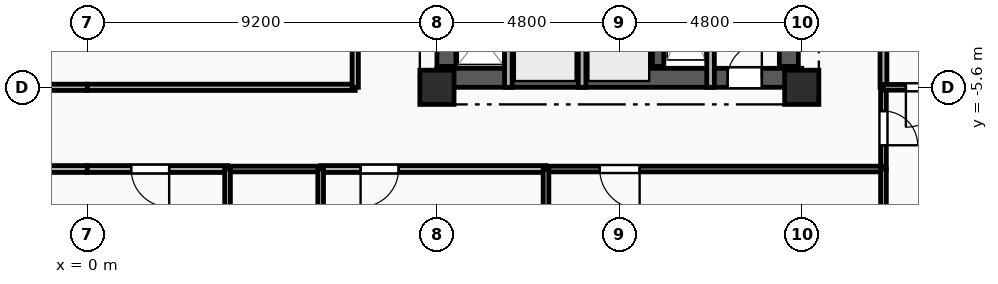
"""IFC4 building model, lengths in metres.
Left out: names, types, materials, properties, quantities, classifications, styles, units other than length and angle.
Written with IfcOpenShell. Run it as: python <this file> out.ifc"""

import sys

from ifc_helpers import new_model, si_unit, direction, frame, frame_2d, origin, origin_2d, place, context, subcontext, project, spatial, rectangle, extrude, element, fill, save


model = new_model("IFC4")
c1 = context("Model", 3, precision=1e-05, world=origin(), true_north=direction((0.0, 1.0)))
c2 = subcontext(c1, "Body", "Model", "MODEL_VIEW")
j1 = project(units=[si_unit("LENGTHUNIT", "METRE"), si_unit("PLANEANGLEUNIT", "RADIAN")], contexts=[c1])
p1 = place(None, origin())
s1 = spatial("IfcSite", under=j1, at=p1, CompositionType="ELEMENT")
p2 = place(p1, origin())
s2 = spatial("IfcBuilding", under=s1, at=p2, CompositionType="ELEMENT")
p3 = place(p2, frame((0.0, 0.0, 134.35)))
s3 = spatial("IfcBuildingStorey", under=s2, at=p3, CompositionType="ELEMENT", Elevation=134.35)
for number, where, z_axis, x_axis in (
    (1, (9.2, -5.6, 0.0), (0.0, 0.0, 1.0), (1.0, 0.0, 0.0)),
    (2, (18.8, -5.6, 0.0), (0.0, 0.0, 1.0), (1.0, 0.0, 0.0)),
):
    element("IfcColumn", number, at=place(p3, frame(where, z_axis=z_axis, x_axis=x_axis)), inside=s3, PredefinedType="COLUMN", context=c2, shape_type="SweptSolid", body=[
        extrude(rectangle(XDim=0.9, YDim=0.9, at=origin_2d()), origin(), (0.0, 0.0, 1.0), 3.35),
    ])
p4 = place(p3, frame((9.2, -5.35, 0.0), z_axis=(0.0, 0.0, 1.0), x_axis=(1.0, 0.0, 0.0)))
e3 = element("IfcWall", 3, at=p4, inside=s3, PredefinedType="SHEAR", context=c2, shape_type="SweptSolid", body=[
    extrude(rectangle(XDim=9.6, YDim=0.5, at=frame_2d((4.8, 0.0))), origin(), (0.0, 0.0, 1.0), 3.04),
])
p5 = place(p4, frame((7.65, 0.0, 0.0)))
e4 = element("IfcOpeningElement", 4, at=p5, cuts=e3, PredefinedType="OPENING", context=c2, shape_type="SweptSolid", body=[
    extrude(rectangle(XDim=0.9, YDim=2.1, at=frame_2d((0.45, 1.05))), frame((0.0, 0.26, 0.0), z_axis=(0.0, -1.0, 0.0), x_axis=(1.0, 0.0, 0.0)), (0.0, 0.0, 1.0), 0.52),
])
p6 = place(p3, frame((9.45, -5.05, 0.0), z_axis=(0.0, 0.0, 1.0), x_axis=(0.0, 1.0, 0.0)))
e5 = element("IfcWall", 5, at=p6, inside=s3, PredefinedType="SHEAR", context=c2, shape_type="SweptSolid", body=[
    extrude(rectangle(XDim=10.1, YDim=0.5, at=frame_2d((5.05, 0.0))), origin(), (0.0, 0.0, 1.0), 3.04),
])
p7 = place(p6, frame((7.15, 0.0, 0.0)))
e6 = element("IfcOpeningElement", 6, at=p7, cuts=e5, PredefinedType="OPENING", context=c2, shape_type="SweptSolid", body=[
    extrude(rectangle(XDim=0.9, YDim=2.1, at=frame_2d((0.45, 1.05))), frame((0.0, 0.26, 0.0), z_axis=(0.0, -1.0, 0.0), x_axis=(1.0, 0.0, 0.0)), (0.0, 0.0, 1.0), 0.52),
])
p8 = place(p6, frame((2.4, 0.0, 0.0)))
e7 = element("IfcOpeningElement", 7, at=p8, cuts=e5, PredefinedType="OPENING", context=c2, shape_type="SweptSolid", body=[
    extrude(rectangle(XDim=1.2, YDim=2.15, at=frame_2d((0.6, 1.075))), frame((0.0, 0.26, 0.0), z_axis=(0.0, -1.0, 0.0), x_axis=(1.0, 0.0, 0.0)), (0.0, 0.0, 1.0), 0.52),
])
p9 = place(p3, frame((18.46, -5.05, 0.0), z_axis=(0.0, 0.0, 1.0), x_axis=(0.0, 1.0, 0.0)))
e8 = element("IfcWall", 8, at=p9, inside=s3, PredefinedType="SHEAR", context=c2, shape_type="SweptSolid", body=[
    extrude(rectangle(XDim=10.1, YDim=0.5, at=frame_2d((5.05, 0.0))), origin(), (0.0, 0.0, 1.0), 3.04),
])
p10 = place(p3, frame((15.02, -5.05, 0.0), z_axis=(0.0, 0.0, 1.0), x_axis=(0.0, 1.0, 0.0)))
e9 = element("IfcWall", 9, at=p10, inside=s3, PredefinedType="SHEAR", context=c2, shape_type="SweptSolid", body=[
    extrude(rectangle(XDim=10.1, YDim=0.3, at=frame_2d((5.05, 0.0))), origin(), (0.0, 0.0, 1.0), 3.04),
])
p11 = place(p3, frame((16.4, -2.11, 0.0), z_axis=(0.0, 0.0, 1.0), x_axis=(0.0, -1.0, 0.0)))
e10 = element("IfcWall", 10, at=p11, inside=s3, PredefinedType="PARTITIONING", context=c2, shape_type="SweptSolid", body=[
    extrude(rectangle(XDim=3.49, YDim=0.2, at=frame_2d((1.745, 0.0))), origin(), (0.0, 0.0, 1.0), 3.04),
])
for number, where, z_axis, x_axis in (
    (11, (11.08, -5.6, 0.0), (0.0, 0.0, 1.0), (0.0, 1.0, 0.0)),
    (12, (13.02, -5.6, 0.0), (0.0, 0.0, 1.0), (0.0, 1.0, 0.0)),
):
    element("IfcWall", number, at=place(p3, frame(where, z_axis=z_axis, x_axis=x_axis)), inside=s3, PredefinedType="PARTITIONING", context=c2, shape_type="SweptSolid", body=[
        extrude(rectangle(XDim=2.25, YDim=0.2, at=frame_2d((1.125, 0.0))), origin(), (0.0, 0.0, 1.0), 3.04),
    ])
p12 = place(p3, frame((0.0, -7.75, 0.0), z_axis=(0.0, 0.0, 1.0), x_axis=(-1.0, 0.0, 0.0)))
e13 = element("IfcWall", 13, at=p12, inside=s3, PredefinedType="PARTITIONING", context=c2, shape_type="SweptSolid", body=[
    extrude(rectangle(XDim=2.24, YDim=0.18, at=frame_2d((1.12, 0.0))), origin(), (0.0, 0.0, 1.0), 3.04),
])
p13 = place(p3, frame((-7.05, -5.6, 0.0), z_axis=(0.0, 0.0, 1.0), x_axis=(1.0, 0.0, 0.0)))
e14 = element("IfcWall", 14, at=p13, inside=s3, PredefinedType="PARTITIONING", context=c2, shape_type="SweptSolid", body=[
    extrude(rectangle(XDim=7.05, YDim=0.165, at=frame_2d((3.525, 0.0))), origin(), (0.0, 0.0, 1.0), 2.525),
])
p14 = place(p3, frame((20.95, -5.6, 0.0), z_axis=(0.0, 0.0, 1.0), x_axis=(0.0, -1.0, 0.0)))
e15 = element("IfcWall", 15, at=p14, inside=s3, PredefinedType="PARTITIONING", context=c2, shape_type="SweptSolid", body=[
    extrude(rectangle(XDim=2.15, YDim=0.15, at=frame_2d((1.075, 0.0))), origin(), (0.0, 0.0, 1.0), 3.04),
])
p15 = place(p14, frame((0.625, 0.0, 0.0)))
e16 = element("IfcOpeningElement", 16, at=p15, cuts=e15, PredefinedType="OPENING", context=c2, shape_type="SweptSolid", body=[
    extrude(rectangle(XDim=0.9, YDim=2.1, at=frame_2d((0.45, 1.05))), frame((0.0, 0.085, 0.0), z_axis=(0.0, -1.0, 0.0), x_axis=(1.0, 0.0, 0.0)), (0.0, 0.0, 1.0), 0.17),
])
p16 = place(p3, frame((3.69, -7.75, 0.0), z_axis=(0.0, 0.0, 1.0), x_axis=(-1.0, 0.0, 0.0)))
e17 = element("IfcWall", 17, at=p16, inside=s3, PredefinedType="PARTITIONING", context=c2, shape_type="SweptSolid", body=[
    extrude(rectangle(XDim=3.69, YDim=0.18, at=frame_2d((1.845, 0.0))), origin(), (0.0, 0.0, 1.0), 3.04),
])
p17 = place(p16, frame((1.536, 0.0, 0.0)))
e18 = element("IfcOpeningElement", 18, at=p17, cuts=e17, PredefinedType="OPENING", context=c2, shape_type="SweptSolid", body=[
    extrude(rectangle(XDim=1.0, YDim=2.15, at=frame_2d((0.5, 1.075))), frame((0.0, 0.1, 0.0), z_axis=(0.0, -1.0, 0.0), x_axis=(1.0, 0.0, 0.0)), (0.0, 0.0, 1.0), 0.2),
])
p18 = place(p3, frame((12.07, -7.75, 0.0), z_axis=(0.0, 0.0, 1.0), x_axis=(-1.0, 0.0, 0.0)))
e19 = element("IfcWall", 19, at=p18, inside=s3, PredefinedType="PARTITIONING", context=c2, shape_type="SweptSolid", body=[
    extrude(rectangle(XDim=5.93, YDim=0.18, at=frame_2d((2.965, 0.0))), origin(), (0.0, 0.0, 1.0), 3.04),
])
p19 = place(p18, frame((3.879, 0.0, 0.0)))
e20 = element("IfcOpeningElement", 20, at=p19, cuts=e19, PredefinedType="OPENING", context=c2, shape_type="SweptSolid", body=[
    extrude(rectangle(XDim=1.0, YDim=2.15, at=frame_2d((0.5, 1.075))), frame((0.0, 0.1, 0.0), z_axis=(0.0, -1.0, 0.0), x_axis=(1.0, 0.0, 0.0)), (0.0, 0.0, 1.0), 0.2),
])
p20 = place(p3, frame((6.14, -7.75, 0.0), z_axis=(0.0, 0.0, 1.0), x_axis=(-1.0, 0.0, 0.0)))
e21 = element("IfcWall", 21, at=p20, inside=s3, PredefinedType="PLUMBINGWALL", context=c2, shape_type="SweptSolid", body=[
    extrude(rectangle(XDim=2.45, YDim=0.15, at=frame_2d((1.225, 0.0))), origin(), (0.0, 0.0, 1.0), 3.04),
])
p21 = place(p3, frame((20.95, -7.75, 0.0), z_axis=(0.0, 0.0, 1.0), x_axis=(-1.0, 0.0, 0.0)))
e22 = element("IfcWall", 22, at=p21, inside=s3, PredefinedType="PARTITIONING", context=c2, shape_type="SweptSolid", body=[
    extrude(rectangle(XDim=8.88, YDim=0.15, at=frame_2d((4.44, 0.0))), origin(), (0.0, 0.0, 1.0), 3.04),
])
p22 = place(p21, frame((6.416, 0.0, 0.0)))
e23 = element("IfcOpeningElement", 23, at=p22, cuts=e22, PredefinedType="OPENING", context=c2, shape_type="SweptSolid", body=[
    extrude(rectangle(XDim=1.05, YDim=2.15, at=frame_2d((0.525, 1.075))), frame((0.0, 0.085, 0.0), z_axis=(0.0, -1.0, 0.0), x_axis=(1.0, 0.0, 0.0)), (0.0, 0.0, 1.0), 0.17),
])
p23 = place(p3, frame((0.0, -5.6, 0.0), z_axis=(0.0, 0.0, 1.0), x_axis=(1.0, 0.0, 0.0)))
e24 = element("IfcWall", 24, at=p23, inside=s3, PredefinedType="PARTITIONING", context=c2, shape_type="SweptSolid", body=[
    extrude(rectangle(XDim=7.05, YDim=0.165, at=frame_2d((3.525, 0.0))), origin(), (0.0, 0.0, 1.0), 2.525),
])
p24 = place(p3, frame((20.95, 8.5, 0.0), z_axis=(0.0, 0.0, 1.0), x_axis=(0.0, -1.0, 0.0)))
e25 = element("IfcWall", 25, at=p24, inside=s3, PredefinedType="PARTITIONING", context=c2, shape_type="SweptSolid", body=[
    extrude(rectangle(XDim=14.1, YDim=0.18, at=frame_2d((7.05, 0.0))), origin(), (0.0, 0.0, 1.0), 3.04),
])
p25 = place(p24, frame((8.042, 0.0, 0.0)))
e26 = element("IfcOpeningElement", 26, at=p25, cuts=e25, PredefinedType="OPENING", context=c2, shape_type="SweptSolid", body=[
    extrude(rectangle(XDim=1.0, YDim=2.15, at=frame_2d((0.5, 1.075))), frame((0.0, 0.1, 0.0), z_axis=(0.0, -1.0, 0.0), x_axis=(1.0, 0.0, 0.0)), (0.0, 0.0, 1.0), 0.2),
])
p26 = place(p3, frame((7.05, -5.6, 0.0), z_axis=(0.0, 0.0, 1.0), x_axis=(0.0, 1.0, 0.0)))
e27 = element("IfcWall", 27, at=p26, inside=s3, PredefinedType="PARTITIONING", context=c2, shape_type="SweptSolid", body=[
    extrude(rectangle(XDim=2.65, YDim=0.165, at=frame_2d((1.325, 0.0))), origin(), (0.0, 0.0, 1.0), 3.04),
])
p27 = place(p3, frame((23.18, -5.6, 0.0), z_axis=(0.0, 0.0, 1.0), x_axis=(-1.0, 0.0, 0.0)))
e28 = element("IfcWall", 28, at=p27, inside=s3, PredefinedType="PARTITIONING", context=c2, shape_type="SweptSolid", body=[
    extrude(rectangle(XDim=2.23, YDim=0.15, at=frame_2d((1.115, 0.0))), origin(), (0.0, 0.0, 1.0), 3.04),
])
p28 = place(p27, frame((0.59, 0.0, 0.0)))
e29 = element("IfcOpeningElement", 29, at=p28, cuts=e28, PredefinedType="OPENING", context=c2, shape_type="SweptSolid", body=[
    extrude(rectangle(XDim=1.05, YDim=2.15, at=frame_2d((0.525, 1.075))), frame((0.0, 0.085, 0.0), z_axis=(0.0, -1.0, 0.0), x_axis=(1.0, 0.0, 0.0)), (0.0, 0.0, 1.0), 0.17),
])
p29 = place(p3, frame((20.95, -15.6, 0.0), z_axis=(0.0, 0.0, 1.0), x_axis=(0.0, 1.0, 0.0)))
e30 = element("IfcWall", 30, at=p29, inside=s3, PredefinedType="PARTITIONING", context=c2, shape_type="SweptSolid", body=[
    extrude(rectangle(XDim=7.85, YDim=0.15, at=frame_2d((3.925, 0.0))), origin(), (0.0, 0.0, 1.0), 3.04),
])
for number, where, z_axis, x_axis in (
    (31, (3.69, -7.75, 0.0), (0.0, 0.0, 1.0), (0.0, -1.0, 0.0)),
    (32, (6.14, -9.9, 0.0), (0.0, 0.0, 1.0), (0.0, 1.0, 0.0)),
):
    element("IfcWall", number, at=place(p3, frame(where, z_axis=z_axis, x_axis=x_axis)), inside=s3, PredefinedType="PLUMBINGWALL", context=c2, shape_type="SweptSolid", body=[
        extrude(rectangle(XDim=2.15, YDim=0.15, at=frame_2d((1.075, 0.0))), origin(), (0.0, 0.0, 1.0), 3.04),
    ])
p30 = place(p3, frame((12.07, -7.75, 0.0), z_axis=(0.0, 0.0, 1.0), x_axis=(0.0, -1.0, 0.0)))
e33 = element("IfcWall", 33, at=p30, inside=s3, PredefinedType="PARTITIONING", context=c2, shape_type="SweptSolid", body=[
    extrude(rectangle(XDim=7.85, YDim=0.15, at=frame_2d((3.925, 0.0))), origin(), (0.0, 0.0, 1.0), 3.04),
])
p31 = place(p5, origin())
e34 = element("IfcDoor", 34, at=p31, inside=s3, OperationType="SINGLE_SWING_RIGHT", PredefinedType="DOOR", context=c2, shape_type="SweptSolid", body=[
    extrude(rectangle(XDim=0.9, YDim=2.1, at=frame_2d((0.45, 1.05))), frame((0.0, 0.025, 0.0), z_axis=(0.0, -1.0, 0.0), x_axis=(1.0, 0.0, 0.0)), (0.0, 0.0, 1.0), 0.05),
])
fill(e4, e34)
p32 = place(p15, origin())
e35 = element("IfcDoor", 35, at=p32, inside=s3, OperationType="SINGLE_SWING_RIGHT", PredefinedType="DOOR", context=c2, shape_type="SweptSolid", body=[
    extrude(rectangle(XDim=0.9, YDim=2.1, at=frame_2d((0.45, 1.05))), frame((0.0, 0.025, 0.0), z_axis=(0.0, -1.0, 0.0), x_axis=(1.0, 0.0, 0.0)), (0.0, 0.0, 1.0), 0.05),
])
fill(e16, e35)
p33 = place(p17, origin())
e36 = element("IfcDoor", 36, at=p33, inside=s3, OperationType="SINGLE_SWING_LEFT", PredefinedType="DOOR", context=c2, shape_type="SweptSolid", body=[
    extrude(rectangle(XDim=1.0, YDim=2.15, at=frame_2d((0.5, 1.075))), frame((0.0, 0.025, 0.0), z_axis=(0.0, -1.0, 0.0), x_axis=(1.0, 0.0, 0.0)), (0.0, 0.0, 1.0), 0.05),
])
fill(e18, e36)
p34 = place(p19, origin())
e37 = element("IfcDoor", 37, at=p34, inside=s3, OperationType="SINGLE_SWING_RIGHT", PredefinedType="DOOR", context=c2, shape_type="SweptSolid", body=[
    extrude(rectangle(XDim=1.0, YDim=2.15, at=frame_2d((0.5, 1.075))), frame((0.0, 0.025, 0.0), z_axis=(0.0, -1.0, 0.0), x_axis=(1.0, 0.0, 0.0)), (0.0, 0.0, 1.0), 0.05),
])
fill(e20, e37)
p35 = place(p22, origin())
e38 = element("IfcDoor", 38, at=p35, inside=s3, OperationType="SINGLE_SWING_LEFT", PredefinedType="DOOR", context=c2, shape_type="SweptSolid", body=[
    extrude(rectangle(XDim=1.05, YDim=2.15, at=frame_2d((0.525, 1.075))), frame((0.0, 0.025, 0.0), z_axis=(0.0, -1.0, 0.0), x_axis=(1.0, 0.0, 0.0)), (0.0, 0.0, 1.0), 0.05),
])
fill(e23, e38)
p36 = place(p28, origin())
e39 = element("IfcDoor", 39, at=p36, inside=s3, OperationType="SINGLE_SWING_RIGHT", PredefinedType="DOOR", context=c2, shape_type="SweptSolid", body=[
    extrude(rectangle(XDim=1.05, YDim=2.15, at=frame_2d((0.525, 1.075))), frame((0.0, 0.025, 0.0), z_axis=(0.0, -1.0, 0.0), x_axis=(1.0, 0.0, 0.0)), (0.0, 0.0, 1.0), 0.05),
])
fill(e29, e39)
save(model, sys.argv[1])
